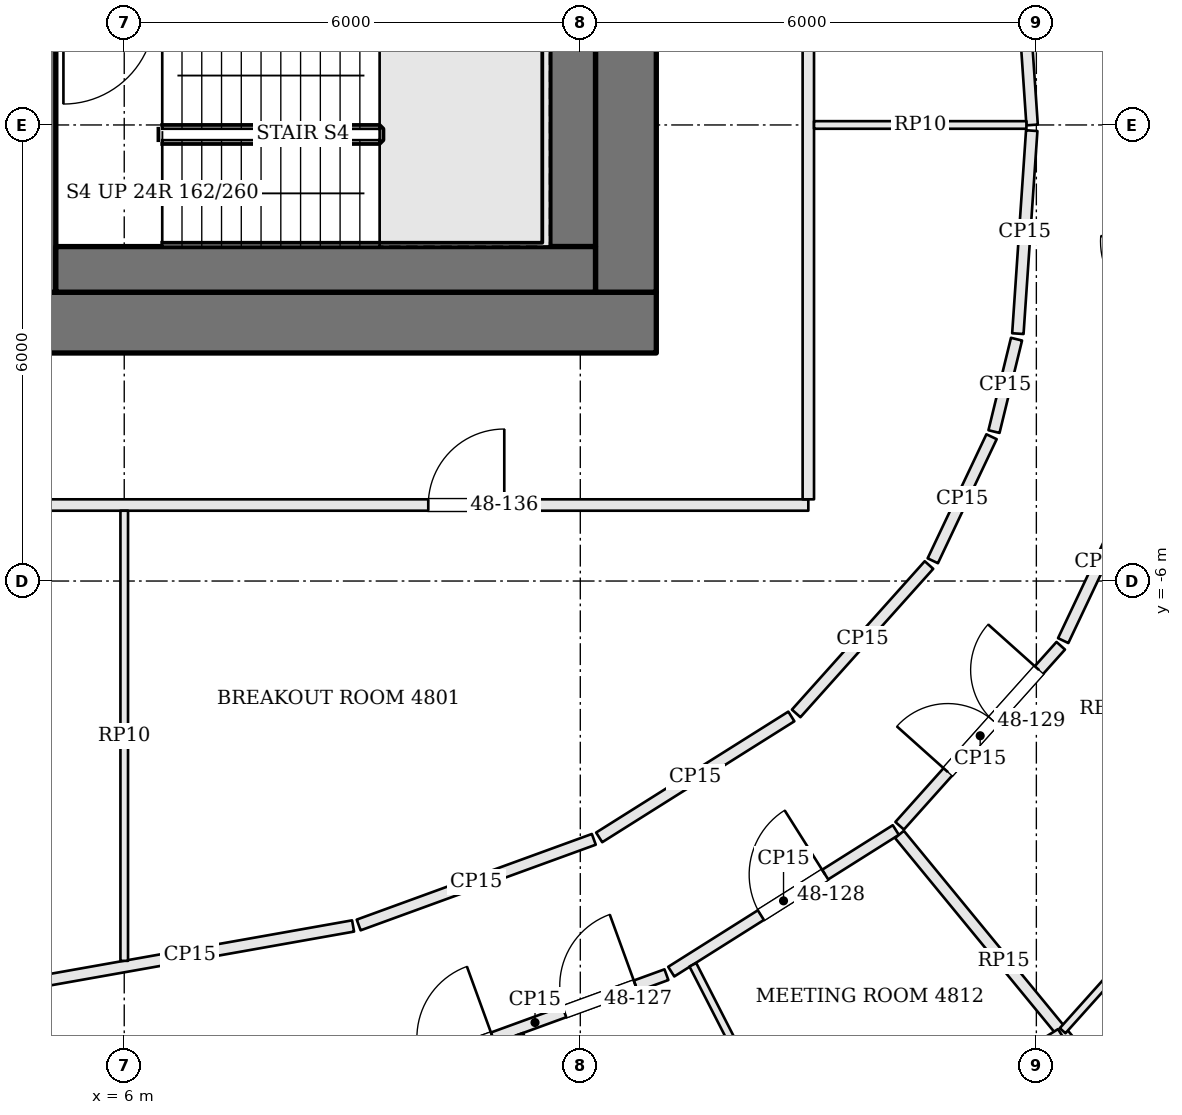
"""IFC4 building model, lengths in metres.
Left out: names, types, materials, properties, quantities, classifications, styles, units other than length and angle.
Written with IfcOpenShell. Run it as: python <this file> out.ifc"""

import sys

from ifc_helpers import new_model, si_unit, direction, frame, frame_2d, origin, place, context, subcontext, project, spatial, rectangle, extrude, element, fill, save


model = new_model("IFC4")
c1 = context("Model", 3, precision=1e-05, world=origin(), true_north=direction((0.0, 1.0)))
c2 = subcontext(c1, "Body", "Model", "MODEL_VIEW")
j1 = project(units=[si_unit("LENGTHUNIT", "METRE"), si_unit("PLANEANGLEUNIT", "RADIAN")], contexts=[c1])
p1 = place(None, origin())
s1 = spatial("IfcSite", under=j1, at=p1, CompositionType="ELEMENT")
p2 = place(p1, origin())
s2 = spatial("IfcBuilding", under=s1, at=p2, CompositionType="ELEMENT")
p3 = place(p2, frame((0.0, 0.0, 197.4)))
s3 = spatial("IfcBuildingStorey", under=s2, at=p3, CompositionType="ELEMENT", Elevation=197.4)
p4 = place(p3, frame((-13.0, -2.6, 0.0), z_axis=(0.0, 0.0, 1.0), x_axis=(1.0, 0.0, 0.0)))
e1 = element("IfcWall", 1, at=p4, inside=s3, PredefinedType="SHEAR", context=c2, shape_type="SweptSolid", body=[
    extrude(rectangle(XDim=26.0, YDim=0.8, at=frame_2d((13.0, 0.0))), origin(), (0.0, 0.0, 1.0), 3.9),
])
p5 = place(p4, frame((8.5, 0.0, 0.0)))
e2 = element("IfcOpeningElement", 2, at=p5, cuts=e1, PredefinedType="OPENING", context=c2, shape_type="SweptSolid", body=[
    extrude(rectangle(XDim=1.0, YDim=2.1, at=frame_2d((0.5, 1.05))), frame((0.0, 0.41, 0.0), z_axis=(0.0, -1.0, 0.0), x_axis=(1.0, 0.0, 0.0)), (0.0, 0.0, 1.0), 0.82),
])
p6 = place(p4, frame((11.025, 0.0, 0.0)))
e3 = element("IfcOpeningElement", 3, at=p6, cuts=e1, PredefinedType="OPENING", context=c2, shape_type="SweptSolid", body=[
    extrude(rectangle(XDim=0.9, YDim=2.1, at=frame_2d((0.45, 1.05))), frame((0.0, 0.41, 0.0), z_axis=(0.0, -1.0, 0.0), x_axis=(1.0, 0.0, 0.0)), (0.0, 0.0, 1.0), 0.82),
])
p7 = place(p4, frame((14.225, 0.0, 0.0)))
e4 = element("IfcOpeningElement", 4, at=p7, cuts=e1, PredefinedType="OPENING", context=c2, shape_type="SweptSolid", body=[
    extrude(rectangle(XDim=0.9, YDim=2.1, at=frame_2d((0.45, 1.05))), frame((0.0, 0.41, 0.0), z_axis=(0.0, -1.0, 0.0), x_axis=(1.0, 0.0, 0.0)), (0.0, 0.0, 1.0), 0.82),
])
p8 = place(p4, frame((16.6, 0.0, 0.0)))
e5 = element("IfcOpeningElement", 5, at=p8, cuts=e1, PredefinedType="OPENING", context=c2, shape_type="SweptSolid", body=[
    extrude(rectangle(XDim=1.0, YDim=2.1, at=frame_2d((0.5, 1.05))), frame((0.0, 0.41, 0.0), z_axis=(0.0, -1.0, 0.0), x_axis=(1.0, 0.0, 0.0)), (0.0, 0.0, 1.0), 0.82),
])
p9 = place(p3, frame((12.6, -2.2, 0.0), z_axis=(0.0, 0.0, 1.0), x_axis=(0.0, 1.0, 0.0)))
e6 = element("IfcWall", 6, at=p9, inside=s3, PredefinedType="SHEAR", context=c2, shape_type="SweptSolid", body=[
    extrude(rectangle(XDim=13.4, YDim=0.8, at=frame_2d((6.7, 0.0))), origin(), (0.0, 0.0, 1.0), 3.9),
])
p10 = place(p9, frame((7.4, 0.0, 0.0)))
e7 = element("IfcOpeningElement", 7, at=p10, cuts=e6, PredefinedType="OPENING", context=c2, shape_type="SweptSolid", body=[
    extrude(rectangle(XDim=1.8, YDim=2.1, at=frame_2d((0.9, 1.05))), frame((0.0, 0.41, 0.0), z_axis=(0.0, -1.0, 0.0), x_axis=(1.0, 0.0, 0.0)), (0.0, 0.0, 1.0), 0.82),
])
p11 = place(p3, frame((4.975, 11.2, 0.0), z_axis=(0.0, 0.0, 1.0), x_axis=(0.0, -1.0, 0.0)))
e8 = element("IfcWall", 8, at=p11, inside=s3, PredefinedType="SOLIDWALL", context=c2, shape_type="SweptSolid", body=[
    extrude(rectangle(XDim=13.4, YDim=0.25, at=frame_2d((6.7, 0.0))), origin(), (0.0, 0.0, 1.0), 3.7),
])
p12 = place(p11, frame((5.25, 0.0, 0.0)))
e9 = element("IfcOpeningElement", 9, at=p12, cuts=e8, PredefinedType="OPENING", context=c2, shape_type="SweptSolid", body=[
    extrude(rectangle(XDim=1.2, YDim=2.1, at=frame_2d((0.6, 1.05))), frame((0.0, 0.135, 0.0), z_axis=(0.0, -1.0, 0.0), x_axis=(1.0, 0.0, 0.0)), (0.0, 0.0, 1.0), 0.27),
])
p13 = place(p3, frame((11.9, 1.35, 0.0), z_axis=(0.0, 0.0, 1.0), x_axis=(0.0, -1.0, 0.0)))
e10 = element("IfcWall", 10, at=p13, inside=s3, PredefinedType="SOLIDWALL", context=c2, shape_type="SweptSolid", body=[
    extrude(rectangle(XDim=2.95, YDim=0.6, at=frame_2d((1.475, 0.0))), origin(), (0.0, 0.0, 1.0), 3.7),
])
p14 = place(p3, frame((12.2, -1.9, 0.0), z_axis=(0.0, 0.0, 1.0), x_axis=(-1.0, 0.0, 0.0)))
e11 = element("IfcWall", 11, at=p14, inside=s3, PredefinedType="SOLIDWALL", context=c2, shape_type="SweptSolid", body=[
    extrude(rectangle(XDim=7.1, YDim=0.6, at=frame_2d((3.55, 0.0))), origin(), (0.0, 0.0, 1.0), 3.7),
])
p15 = place(p3, frame((9.676, -12.438, 0.0), z_axis=(0.0, 0.0, 1.0), x_axis=(0.939640289748, 0.342163887461, 0.0)))
e12 = element("IfcWall", 12, at=p15, inside=s3, PredefinedType="PARTITIONING", context=c2, shape_type="SweptSolid", body=[
    extrude(rectangle(XDim=3.68, YDim=0.15, at=frame_2d((1.84, 0.0))), origin(), (0.0, 0.0, 1.0), 3.084),
])
p16 = place(p15, frame((0.25, 0.0, 0.0)))
e13 = element("IfcOpeningElement", 13, at=p16, cuts=e12, PredefinedType="OPENING", context=c2, shape_type="SweptSolid", body=[
    extrude(rectangle(XDim=1.0, YDim=2.4, at=frame_2d((0.5, 1.2))), frame((0.0, 0.085, 0.0), z_axis=(0.0, -1.0, 0.0), x_axis=(1.0, 0.0, 0.0)), (0.0, 0.0, 1.0), 0.17),
])
p17 = place(p15, frame((2.25, 0.0, 0.0)))
e14 = element("IfcOpeningElement", 14, at=p17, cuts=e12, PredefinedType="OPENING", context=c2, shape_type="SweptSolid", body=[
    extrude(rectangle(XDim=1.0, YDim=2.4, at=frame_2d((0.5, 1.2))), frame((0.0, 0.085, 0.0), z_axis=(0.0, -1.0, 0.0), x_axis=(1.0, 0.0, 0.0)), (0.0, 0.0, 1.0), 0.17),
])
p18 = place(p3, frame((13.197, -11.139, 0.0), z_axis=(0.0, 0.0, 1.0), x_axis=(0.845847451173, 0.533424867572, 0.0)))
e15 = element("IfcWall", 15, at=p18, inside=s3, PredefinedType="PARTITIONING", context=c2, shape_type="SweptSolid", body=[
    extrude(rectangle(XDim=3.493, YDim=0.15, at=frame_2d((1.747, 0.0))), origin(), (0.0, 0.0, 1.0), 3.084),
])
p19 = place(p18, frame((1.394, 0.0, 0.0)))
e16 = element("IfcOpeningElement", 16, at=p19, cuts=e15, PredefinedType="OPENING", context=c2, shape_type="SweptSolid", body=[
    extrude(rectangle(XDim=1.0, YDim=2.4, at=frame_2d((0.5, 1.2))), frame((0.0, 0.085, 0.0), z_axis=(0.0, -1.0, 0.0), x_axis=(1.0, 0.0, 0.0)), (0.0, 0.0, 1.0), 0.17),
])
p20 = place(p3, frame((18.943, -12.675, 0.0), z_axis=(0.0, 0.0, 1.0), x_axis=(-0.634730994321, 0.772733178301, 0.0)))
e17 = element("IfcWall", 17, at=p20, inside=s3, PredefinedType="PARTITIONING", context=c2, shape_type="SweptSolid", body=[
    extrude(rectangle(XDim=4.324, YDim=0.15, at=frame_2d((2.162, 0.0))), origin(), (0.0, 0.0, 1.0), 3.084),
])
p21 = place(p3, frame((16.201, -9.22, 0.0), z_axis=(0.0, 0.0, 1.0), x_axis=(0.666925083627, 0.745124776685, 0.0)))
e18 = element("IfcWall", 18, at=p21, inside=s3, PredefinedType="PARTITIONING", context=c2, shape_type="SweptSolid", body=[
    extrude(rectangle(XDim=3.178, YDim=0.15, at=frame_2d((1.589, 0.0))), origin(), (0.0, 0.0, 1.0), 3.084),
])
p22 = place(p21, frame((0.95, 0.0, 0.0)))
e19 = element("IfcOpeningElement", 19, at=p22, cuts=e18, PredefinedType="OPENING", context=c2, shape_type="SweptSolid", body=[
    extrude(rectangle(XDim=1.8, YDim=2.1, at=frame_2d((0.9, 1.05))), frame((0.0, 0.085, 0.0), z_axis=(0.0, -1.0, 0.0), x_axis=(1.0, 0.0, 0.0)), (0.0, 0.0, 1.0), 0.17),
])
p23 = place(p3, frame((18.353, -6.784, 0.0), z_axis=(0.0, 0.0, 1.0), x_axis=(0.428086344739, 0.903737838894, 0.0)))
e20 = element("IfcWall", 20, at=p23, inside=s3, PredefinedType="PARTITIONING", context=c2, shape_type="SweptSolid", body=[
    extrude(rectangle(XDim=2.3, YDim=0.15, at=frame_2d((1.15, 0.0))), origin(), (0.0, 0.0, 1.0), 3.084),
])
p24 = place(p3, frame((17.762, 2.67, 0.0), z_axis=(0.0, 0.0, 1.0), x_axis=(0.068135311644, -0.997676089373, 0.0)))
e21 = element("IfcWall", 21, at=p24, inside=s3, PredefinedType="PARTITIONING", context=c2, shape_type="SweptSolid", body=[
    extrude(rectangle(XDim=2.677, YDim=0.15, at=frame_2d((1.338, 0.0))), origin(), (0.0, 0.0, 1.0), 3.084),
])
p25 = place(p3, frame((17.939, -0.075, 0.0), z_axis=(0.0, 0.0, 1.0), x_axis=(-0.068226099283, -0.99766988497, 0.0)))
e22 = element("IfcWall", 22, at=p25, inside=s3, PredefinedType="PARTITIONING", context=c2, shape_type="SweptSolid", body=[
    extrude(rectangle(XDim=2.677, YDim=0.15, at=frame_2d((1.338, 0.0))), origin(), (0.0, 0.0, 1.0), 3.084),
])
p26 = place(p3, frame((17.739, -2.818, 0.0), z_axis=(0.0, 0.0, 1.0), x_axis=(-0.236884307907, -0.971537865792, 0.0)))
e23 = element("IfcWall", 23, at=p26, inside=s3, PredefinedType="PARTITIONING", context=c2, shape_type="SweptSolid", body=[
    extrude(rectangle(XDim=1.251, YDim=0.15, at=frame_2d((0.625, 0.0))), origin(), (0.0, 0.0, 1.0), 3.084),
])
p27 = place(p3, frame((17.41, -4.102, 0.0), z_axis=(0.0, 0.0, 1.0), x_axis=(-0.428074720318, -0.903743345107, 0.0)))
e24 = element("IfcWall", 24, at=p27, inside=s3, PredefinedType="PARTITIONING", context=c2, shape_type="SweptSolid", body=[
    extrude(rectangle(XDim=1.806, YDim=0.15, at=frame_2d((0.903, 0.0))), origin(), (0.0, 0.0, 1.0), 3.084),
])
p28 = place(p3, frame((16.587, -5.789, 0.0), z_axis=(0.0, 0.0, 1.0), x_axis=(-0.666887460656, -0.745158449472, 0.0)))
e25 = element("IfcWall", 25, at=p28, inside=s3, PredefinedType="PARTITIONING", context=c2, shape_type="SweptSolid", body=[
    extrude(rectangle(XDim=2.62, YDim=0.15, at=frame_2d((1.31, 0.0))), origin(), (0.0, 0.0, 1.0), 3.084),
])
p29 = place(p3, frame((14.777, -7.781, 0.0), z_axis=(0.0, 0.0, 1.0), x_axis=(-0.846359741043, -0.532611667862, 0.0)))
e26 = element("IfcWall", 26, at=p29, inside=s3, PredefinedType="PARTITIONING", context=c2, shape_type="SweptSolid", body=[
    extrude(rectangle(XDim=2.987, YDim=0.15, at=frame_2d((1.494, 0.0))), origin(), (0.0, 0.0, 1.0), 3.084),
])
p30 = place(p3, frame((12.178, -9.398, 0.0), z_axis=(0.0, 0.0, 1.0), x_axis=(-0.939609240084, -0.342249143093, 0.0)))
e27 = element("IfcWall", 27, at=p30, inside=s3, PredefinedType="PARTITIONING", context=c2, shape_type="SweptSolid", body=[
    extrude(rectangle(XDim=3.292, YDim=0.15, at=frame_2d((1.646, 0.0))), origin(), (0.0, 0.0, 1.0), 3.084),
])
p31 = place(p3, frame((9.01, -10.538, 0.0), z_axis=(0.0, 0.0, 1.0), x_axis=(-0.984645638575, -0.174565077936, 0.0)))
e28 = element("IfcWall", 28, at=p31, inside=s3, PredefinedType="PARTITIONING", context=c2, shape_type="SweptSolid", body=[
    extrude(rectangle(XDim=4.358, YDim=0.15, at=frame_2d((2.179, 0.0))), origin(), (0.0, 0.0, 1.0), 3.084),
])
p32 = place(p3, frame((-14.925, -5.0, 0.0), z_axis=(0.0, 0.0, 1.0), x_axis=(1.0, 0.0, 0.0)))
e29 = element("IfcWall", 29, at=p32, inside=s3, PredefinedType="PARTITIONING", context=c2, shape_type="SweptSolid", body=[
    extrude(rectangle(XDim=29.925, YDim=0.15, at=frame_2d((14.962, 0.0))), origin(), (0.0, 0.0, 1.0), 3.084),
])
p33 = place(p32, frame((3.925, 0.0, 0.0)))
e30 = element("IfcOpeningElement", 30, at=p33, cuts=e29, PredefinedType="OPENING", context=c2, shape_type="SweptSolid", body=[
    extrude(rectangle(XDim=1.0, YDim=2.1, at=frame_2d((0.5, 1.05))), frame((0.0, 0.085, 0.0), z_axis=(0.0, -1.0, 0.0), x_axis=(1.0, 0.0, 0.0)), (0.0, 0.0, 1.0), 0.17),
])
p34 = place(p32, frame((14.025, 0.0, 0.0)))
e31 = element("IfcOpeningElement", 31, at=p34, cuts=e29, PredefinedType="OPENING", context=c2, shape_type="SweptSolid", body=[
    extrude(rectangle(XDim=1.8, YDim=2.1, at=frame_2d((0.9, 1.05))), frame((0.0, 0.085, 0.0), z_axis=(0.0, -1.0, 0.0), x_axis=(1.0, 0.0, 0.0)), (0.0, 0.0, 1.0), 0.17),
])
p35 = place(p32, frame((24.925, 0.0, 0.0)))
e32 = element("IfcOpeningElement", 32, at=p35, cuts=e29, PredefinedType="OPENING", context=c2, shape_type="SweptSolid", body=[
    extrude(rectangle(XDim=1.0, YDim=2.1, at=frame_2d((0.5, 1.05))), frame((0.0, 0.085, 0.0), z_axis=(0.0, -1.0, 0.0), x_axis=(1.0, 0.0, 0.0)), (0.0, 0.0, 1.0), 0.17),
])
p36 = place(p3, frame((15.0, -4.925, 0.0), z_axis=(0.0, 0.0, 1.0), x_axis=(0.0, 1.0, 0.0)))
e33 = element("IfcWall", 33, at=p36, inside=s3, PredefinedType="PARTITIONING", context=c2, shape_type="SweptSolid", body=[
    extrude(rectangle(XDim=12.583, YDim=0.15, at=frame_2d((6.292, 0.0))), origin(), (0.0, 0.0, 1.0), 3.084),
])
p37 = place(p36, frame((8.291, 0.0, 0.0)))
e34 = element("IfcOpeningElement", 34, at=p37, cuts=e33, PredefinedType="OPENING", context=c2, shape_type="SweptSolid", body=[
    extrude(rectangle(XDim=1.0, YDim=2.1, at=frame_2d((0.5, 1.05))), frame((0.0, 0.085, 0.0), z_axis=(0.0, -1.0, 0.0), x_axis=(1.0, 0.0, 0.0)), (0.0, 0.0, 1.0), 0.17),
])
p38 = place(p3, frame((18.312, -11.938, 0.0), z_axis=(0.0, 0.0, 1.0), x_axis=(-0.846383069278, -0.532574595752, 0.0)))
e35 = element("IfcWall", 35, at=p38, inside=s3, PredefinedType="PARTITIONING", context=c2, shape_type="SweptSolid", body=[
    extrude(rectangle(XDim=4.341, YDim=0.1, at=frame_2d((2.171, 0.0))), origin(), (0.0, 0.0, 1.0), 3.084),
])
p39 = place(p3, frame((11.201, -11.962, 0.0), z_axis=(0.0, 0.0, 1.0), x_axis=(0.32685198031, -0.945075543524, 0.0)))
e36 = element("IfcWall", 36, at=p39, inside=s3, PredefinedType="PARTITIONING", context=c2, shape_type="SweptSolid", body=[
    extrude(rectangle(XDim=3.275, YDim=0.1, at=frame_2d((1.638, 0.0))), origin(), (0.0, 0.0, 1.0), 3.084),
])
p40 = place(p3, frame((13.481, -11.048, 0.0), z_axis=(0.0, 0.0, 1.0), x_axis=(0.455538746767, -0.890215957054, 0.0)))
e37 = element("IfcWall", 37, at=p40, inside=s3, PredefinedType="PARTITIONING", context=c2, shape_type="SweptSolid", body=[
    extrude(rectangle(XDim=3.289, YDim=0.1, at=frame_2d((1.644, 0.0))), origin(), (0.0, 0.0, 1.0), 3.084),
])
p41 = place(p3, frame((21.149, -8.789, 0.0), z_axis=(0.0, 0.0, 1.0), x_axis=(-0.667605024822, -0.744515635049, 0.0)))
e38 = element("IfcWall", 38, at=p41, inside=s3, PredefinedType="PARTITIONING", context=c2, shape_type="SweptSolid", body=[
    extrude(rectangle(XDim=4.2, YDim=0.1, at=frame_2d((2.1, 0.0))), origin(), (0.0, 0.0, 1.0), 3.084),
])
p42 = place(p41, frame((0.733, 0.0, 0.0)))
e39 = element("IfcOpeningElement", 39, at=p42, cuts=e38, PredefinedType="OPENING", context=c2, shape_type="SweptSolid", body=[
    extrude(rectangle(XDim=1.0, YDim=2.1, at=frame_2d((0.5, 1.05))), frame((0.0, 0.06, 0.0), z_axis=(0.0, -1.0, 0.0), x_axis=(1.0, 0.0, 0.0)), (0.0, 0.0, 1.0), 0.12),
])
p43 = place(p3, frame((6.0, -10.997, 0.0), z_axis=(0.0, 0.0, 1.0), x_axis=(0.0, 1.0, 0.0)))
e40 = element("IfcWall", 40, at=p43, inside=s3, PredefinedType="PARTITIONING", context=c2, shape_type="SweptSolid", body=[
    extrude(rectangle(XDim=5.922, YDim=0.1, at=frame_2d((2.961, 0.0))), origin(), (0.0, 0.0, 1.0), 3.084),
])
p44 = place(p3, frame((15.075, 0.0, 0.0), z_axis=(0.0, 0.0, 1.0), x_axis=(1.0, 0.0, 0.0)))
e41 = element("IfcWall", 41, at=p44, inside=s3, PredefinedType="PARTITIONING", context=c2, shape_type="SweptSolid", body=[
    extrude(rectangle(XDim=2.794, YDim=0.1, at=frame_2d((1.397, 0.0))), origin(), (0.0, 0.0, 1.0), 3.084),
])
p45 = place(p17, origin())
e42 = element("IfcDoor", 42, at=p45, inside=s3, OperationType="SINGLE_SWING_RIGHT", PredefinedType="DOOR", context=c2, shape_type="SweptSolid", body=[
    extrude(rectangle(XDim=1.0, YDim=2.4, at=frame_2d((0.5, 1.2))), frame((0.0, 0.025, 0.0), z_axis=(0.0, -1.0, 0.0), x_axis=(1.0, 0.0, 0.0)), (0.0, 0.0, 1.0), 0.05),
])
fill(e14, e42)
p46 = place(p19, origin())
e43 = element("IfcDoor", 43, at=p46, inside=s3, OperationType="SINGLE_SWING_RIGHT", PredefinedType="DOOR", context=c2, shape_type="SweptSolid", body=[
    extrude(rectangle(XDim=1.0, YDim=2.4, at=frame_2d((0.5, 1.2))), frame((0.0, 0.025, 0.0), z_axis=(0.0, -1.0, 0.0), x_axis=(1.0, 0.0, 0.0)), (0.0, 0.0, 1.0), 0.05),
])
fill(e16, e43)
p47 = place(p22, origin())
e44 = element("IfcDoor", 44, at=p47, inside=s3, OperationType="DOUBLE_DOOR_SINGLE_SWING", PredefinedType="DOOR", context=c2, shape_type="SweptSolid", body=[
    extrude(rectangle(XDim=1.8, YDim=2.1, at=frame_2d((0.9, 1.05))), frame((0.0, 0.025, 0.0), z_axis=(0.0, -1.0, 0.0), x_axis=(1.0, 0.0, 0.0)), (0.0, 0.0, 1.0), 0.05),
])
fill(e19, e44)
p48 = place(p35, origin())
e45 = element("IfcDoor", 45, at=p48, inside=s3, OperationType="SINGLE_SWING_RIGHT", PredefinedType="DOOR", context=c2, shape_type="SweptSolid", body=[
    extrude(rectangle(XDim=1.0, YDim=2.1, at=frame_2d((0.5, 1.05))), frame((0.0, 0.025, 0.0), z_axis=(0.0, -1.0, 0.0), x_axis=(1.0, 0.0, 0.0)), (0.0, 0.0, 1.0), 0.05),
])
fill(e32, e45)
save(model, sys.argv[1])
